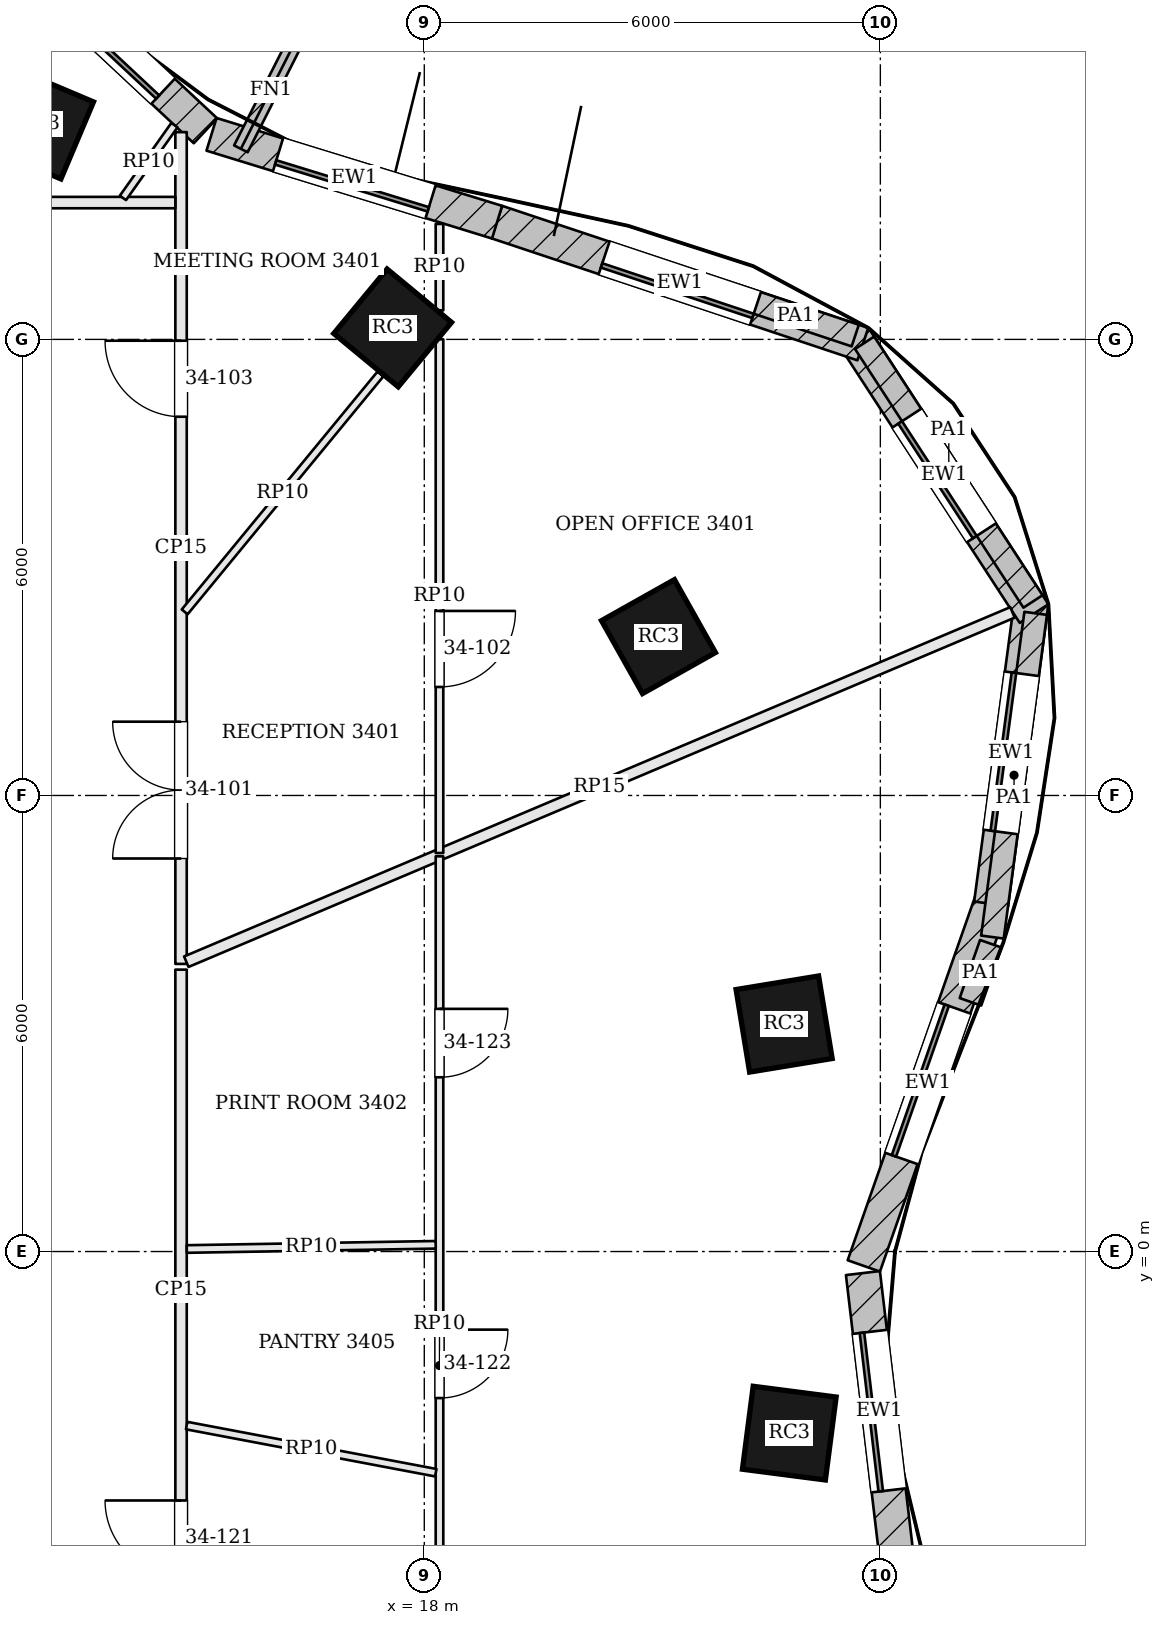
"""IFC4 building model, lengths in metres.
Left out: names, types, materials, properties, quantities, classifications, styles, units other than length and angle.
Written with IfcOpenShell. Run it as: python <this file> out.ifc"""

import sys

from ifc_helpers import new_model, si_unit, direction, frame, frame_2d, origin, origin_2d, place, context, subcontext, project, spatial, rectangle, extrude, element, fill, save


model = new_model("IFC4")
c1 = context("Model", 3, precision=1e-05, world=origin(), true_north=direction((0.0, 1.0)))
c2 = subcontext(c1, "Body", "Model", "MODEL_VIEW")
j1 = project(units=[si_unit("LENGTHUNIT", "METRE"), si_unit("PLANEANGLEUNIT", "RADIAN")], contexts=[c1])
p1 = place(None, origin())
s1 = spatial("IfcSite", under=j1, at=p1, CompositionType="ELEMENT")
p2 = place(p1, origin())
s2 = spatial("IfcBuilding", under=s1, at=p2, CompositionType="ELEMENT")
p3 = place(p2, frame((0.0, 0.0, 142.2)))
s3 = spatial("IfcBuildingStorey", under=s2, at=p3, CompositionType="ELEMENT", Elevation=142.2)
for number, where, z_axis, x_axis in (
    (1, (22.734, 2.993, 0.0), (0.0, 0.0, 1.0), (-0.162, 0.987, 0.0)),
    (2, (21.081, 8.09, 0.0), (0.0, 0.0, 1.0), (-0.49, 0.872, 0.0)),
    (3, (17.584, 12.151, 0.0), (0.0, 0.0, 1.0), (-0.771, 0.637, 0.0)),
    (4, (12.927, 14.832, 0.0), (0.0, 0.0, 1.0), (-0.921, 0.389, 0.0)),
    (5, (22.802, -2.389, 0.0), (0.0, 0.0, 1.0), (0.129, 0.992, 0.0)),
):
    element("IfcColumn", number, at=place(p3, frame(where, z_axis=z_axis, x_axis=x_axis)), inside=s3, PredefinedType="COLUMN", context=c2, shape_type="SweptSolid", body=[
        extrude(rectangle(XDim=1.1, YDim=1.1, at=origin_2d()), origin(), (0.0, 0.0, 1.0), 3.9),
    ])
p4 = place(p3, frame((23.782, -0.189, 0.0), z_axis=(0.0, 0.0, 1.0), x_axis=(0.330794307703, 0.943702880144, 0.0)))
e6 = element("IfcWall", 6, at=p4, inside=s3, PredefinedType="SOLIDWALL", context=c2, shape_type="SweptSolid", body=[
    extrude(rectangle(XDim=5.095, YDim=0.45, at=frame_2d((2.548, 0.0))), origin(), (0.0, 0.0, 1.0), 3.7),
])
p5 = place(p4, frame((1.498, 0.0, 0.9)))
e7 = element("IfcOpeningElement", 7, at=p5, cuts=e6, PredefinedType="OPENING", context=c2, shape_type="SweptSolid", body=[
    extrude(rectangle(XDim=2.1, YDim=2.3, at=frame_2d((1.05, 1.15))), frame((0.0, 0.235, 0.0), z_axis=(0.0, -1.0, 0.0), x_axis=(1.0, 0.0, 0.0)), (0.0, 0.0, 1.0), 0.47),
])
p6 = place(p3, frame((25.457, 4.575, 0.0), z_axis=(0.0, 0.0, 1.0), x_axis=(0.132475046402, 0.991186340746, 0.0)))
e8 = element("IfcWall", 8, at=p6, inside=s3, PredefinedType="SOLIDWALL", context=c2, shape_type="SweptSolid", body=[
    extrude(rectangle(XDim=4.007, YDim=0.45, at=frame_2d((2.003, 0.0))), origin(), (0.0, 0.0, 1.0), 3.7),
])
p7 = place(p6, frame((0.953, 0.0, 0.9)))
e9 = element("IfcOpeningElement", 9, at=p7, cuts=e8, PredefinedType="OPENING", context=c2, shape_type="SweptSolid", body=[
    extrude(rectangle(XDim=2.1, YDim=2.3, at=frame_2d((1.05, 1.15))), frame((0.0, 0.235, 0.0), z_axis=(0.0, -1.0, 0.0), x_axis=(1.0, 0.0, 0.0)), (0.0, 0.0, 1.0), 0.47),
])
p8 = place(p3, frame((26.022, 8.393, 0.0), z_axis=(0.0, 0.0, 1.0), x_axis=(-0.545637310328, 0.838021435035, 0.0)))
e10 = element("IfcWall", 10, at=p8, inside=s3, PredefinedType="SOLIDWALL", context=c2, shape_type="SweptSolid", body=[
    extrude(rectangle(XDim=4.336, YDim=0.45, at=frame_2d((2.168, 0.0))), origin(), (0.0, 0.0, 1.0), 3.7),
])
p9 = place(p8, frame((1.268, 0.0, 0.9)))
e11 = element("IfcOpeningElement", 11, at=p9, cuts=e10, PredefinedType="OPENING", context=c2, shape_type="SweptSolid", body=[
    extrude(rectangle(XDim=1.8, YDim=2.3, at=frame_2d((0.9, 1.15))), frame((0.0, 0.235, 0.0), z_axis=(0.0, -1.0, 0.0), x_axis=(1.0, 0.0, 0.0)), (0.0, 0.0, 1.0), 0.47),
])
p10 = place(p3, frame((23.77, 11.938, 0.0), z_axis=(0.0, 0.0, 1.0), x_axis=(-0.948673679101, 0.316256621402, 0.0)))
e12 = element("IfcWall", 12, at=p10, inside=s3, PredefinedType="SOLIDWALL", context=c2, shape_type="SweptSolid", body=[
    extrude(rectangle(XDim=5.076, YDim=0.45, at=frame_2d((2.538, 0.0))), origin(), (0.0, 0.0, 1.0), 3.7),
])
p11 = place(p10, frame((1.488, 0.0, 0.9)))
e13 = element("IfcOpeningElement", 13, at=p11, cuts=e12, PredefinedType="OPENING", context=c2, shape_type="SweptSolid", body=[
    extrude(rectangle(XDim=2.1, YDim=2.3, at=frame_2d((1.05, 1.15))), frame((0.0, 0.235, 0.0), z_axis=(0.0, -1.0, 0.0), x_axis=(1.0, 0.0, 0.0)), (0.0, 0.0, 1.0), 0.47),
])
p12 = place(p3, frame((18.958, 13.542, 0.0), z_axis=(0.0, 0.0, 1.0), x_axis=(-0.955792437529, 0.294042201668, 0.0)))
e14 = element("IfcWall", 14, at=p12, inside=s3, PredefinedType="SOLIDWALL", context=c2, shape_type="SweptSolid", body=[
    extrude(rectangle(XDim=3.931, YDim=0.45, at=frame_2d((1.965, 0.0))), origin(), (0.0, 0.0, 1.0), 3.7),
])
p13 = place(p12, frame((0.915, 0.0, 0.9)))
e15 = element("IfcOpeningElement", 15, at=p13, cuts=e14, PredefinedType="OPENING", context=c2, shape_type="SweptSolid", body=[
    extrude(rectangle(XDim=2.1, YDim=2.3, at=frame_2d((1.05, 1.15))), frame((0.0, 0.235, 0.0), z_axis=(0.0, -1.0, 0.0), x_axis=(1.0, 0.0, 0.0)), (0.0, 0.0, 1.0), 0.47),
])
p14 = place(p3, frame((15.121, 14.745, 0.0), z_axis=(0.0, 0.0, 1.0), x_axis=(-0.730618259172, 0.68278617397, 0.0)))
e16 = element("IfcWall", 16, at=p14, inside=s3, PredefinedType="SOLIDWALL", context=c2, shape_type="SweptSolid", body=[
    extrude(rectangle(XDim=3.624, YDim=0.45, at=frame_2d((1.812, 0.0))), origin(), (0.0, 0.0, 1.0), 3.7),
])
p15 = place(p14, frame((0.762, 0.0, 0.9)))
e17 = element("IfcOpeningElement", 17, at=p15, cuts=e16, PredefinedType="OPENING", context=c2, shape_type="SweptSolid", body=[
    extrude(rectangle(XDim=2.1, YDim=2.3, at=frame_2d((1.05, 1.15))), frame((0.0, 0.235, 0.0), z_axis=(0.0, -1.0, 0.0), x_axis=(1.0, 0.0, 0.0)), (0.0, 0.0, 1.0), 0.47),
])
p16 = place(p3, frame((24.201, -3.915, 0.0), z_axis=(0.0, 0.0, 1.0), x_axis=(-0.117623597589, 0.993058250703, 0.0)))
e18 = element("IfcWall", 18, at=p16, inside=s3, PredefinedType="SOLIDWALL", context=c2, shape_type="SweptSolid", body=[
    extrude(rectangle(XDim=3.657, YDim=0.45, at=frame_2d((1.829, 0.0))), origin(), (0.0, 0.0, 1.0), 3.7),
])
p17 = place(p16, frame((0.779, 0.0, 0.9)))
e19 = element("IfcOpeningElement", 19, at=p17, cuts=e18, PredefinedType="OPENING", context=c2, shape_type="SweptSolid", body=[
    extrude(rectangle(XDim=2.1, YDim=2.3, at=frame_2d((1.05, 1.15))), frame((0.0, 0.235, 0.0), z_axis=(0.0, -1.0, 0.0), x_axis=(1.0, 0.0, 0.0)), (0.0, 0.0, 1.0), 0.47),
])
p18 = place(p3, frame((15.587, 14.507, 0.0), z_axis=(0.0, 0.0, 1.0), x_axis=(0.452117231361, 0.89195852432, 0.0)))
e20 = element("IfcWall", 20, at=p18, inside=s3, PredefinedType="SOLIDWALL", context=c2, shape_type="SweptSolid", body=[
    extrude(rectangle(XDim=1.75, YDim=0.2, at=frame_2d((0.875, 0.0))), origin(), (0.0, 0.0, 1.0), 3.7),
])
p19 = place(p3, frame((25.185, 3.285, 3.9), z_axis=(0.0, 0.0, 1.0), x_axis=(0.330927638021, 0.943656133554, 0.0)))
e21 = element("IfcWall", 21, at=p19, inside=s3, PredefinedType="PARAPET", context=c2, shape_type="SweptSolid", body=[
    extrude(rectangle(XDim=0.81, YDim=0.3, at=frame_2d((0.405, 0.0))), origin(), (0.0, 0.0, 1.0), 1.1),
])
p20 = place(p3, frame((25.474, 4.137, 3.9), z_axis=(0.0, 0.0, 1.0), x_axis=(0.132506125812, 0.991182186393, 0.0)))
e22 = element("IfcWall", 22, at=p20, inside=s3, PredefinedType="PARAPET", context=c2, shape_type="SweptSolid", body=[
    extrude(rectangle(XDim=4.297, YDim=0.3, at=frame_2d((2.148, 0.0))), origin(), (0.0, 0.0, 1.0), 1.1),
])
p21 = place(p3, frame((26.008, 8.552, 3.9), z_axis=(0.0, 0.0, 1.0), x_axis=(-0.545634876254, 0.83802301986, 0.0)))
e23 = element("IfcWall", 23, at=p21, inside=s3, PredefinedType="PARAPET", context=c2, shape_type="SweptSolid", body=[
    extrude(rectangle(XDim=4.061, YDim=0.3, at=frame_2d((2.03, 0.0))), origin(), (0.0, 0.0, 1.0), 1.1),
])
p22 = place(p3, frame((23.67, 12.05, 3.9), z_axis=(0.0, 0.0, 1.0), x_axis=(-0.948683298051, 0.316227766017, 0.0)))
e24 = element("IfcWall", 24, at=p22, inside=s3, PredefinedType="PARAPET", context=c2, shape_type="SweptSolid", body=[
    extrude(rectangle(XDim=1.655, YDim=0.3, at=frame_2d((0.827, 0.0))), origin(), (0.0, 0.0, 1.0), 1.1),
])
p23 = place(p3, frame((14.8, 3.784, 0.0), z_axis=(0.0, 0.0, 1.0), x_axis=(0.0, 1.0, 0.0)))
e25 = element("IfcWall", 25, at=p23, inside=s3, PredefinedType="PARTITIONING", context=c2, shape_type="SweptSolid", body=[
    extrude(rectangle(XDim=10.943, YDim=0.15, at=frame_2d((5.472, 0.0))), origin(), (0.0, 0.0, 1.0), 3.198),
])
p24 = place(p23, frame((1.387, 0.0, 0.0)))
e26 = element("IfcOpeningElement", 26, at=p24, cuts=e25, PredefinedType="OPENING", context=c2, shape_type="SweptSolid", body=[
    extrude(rectangle(XDim=1.8, YDim=2.1, at=frame_2d((0.9, 1.05))), frame((0.0, 0.085, 0.0), z_axis=(0.0, -1.0, 0.0), x_axis=(1.0, 0.0, 0.0)), (0.0, 0.0, 1.0), 0.17),
])
p25 = place(p23, frame((7.199, 0.0, 0.0)))
e27 = element("IfcOpeningElement", 27, at=p25, cuts=e25, PredefinedType="OPENING", context=c2, shape_type="SweptSolid", body=[
    extrude(rectangle(XDim=1.0, YDim=2.4, at=frame_2d((0.5, 1.2))), frame((0.0, 0.085, 0.0), z_axis=(0.0, -1.0, 0.0), x_axis=(1.0, 0.0, 0.0)), (0.0, 0.0, 1.0), 0.17),
])
p26 = place(p3, frame((14.725, 13.8, 0.0), z_axis=(0.0, 0.0, 1.0), x_axis=(-1.0, 0.0, 0.0)))
e28 = element("IfcWall", 28, at=p26, inside=s3, PredefinedType="PARTITIONING", context=c2, shape_type="SweptSolid", body=[
    extrude(rectangle(XDim=11.638, YDim=0.15, at=frame_2d((5.819, 0.0))), origin(), (0.0, 0.0, 1.0), 3.198),
])
p27 = place(p26, frame((2.95, 0.0, 0.0)))
e29 = element("IfcOpeningElement", 29, at=p27, cuts=e28, PredefinedType="OPENING", context=c2, shape_type="SweptSolid", body=[
    extrude(rectangle(XDim=1.0, YDim=2.1, at=frame_2d((0.5, 1.05))), frame((0.0, 0.085, 0.0), z_axis=(0.0, -1.0, 0.0), x_axis=(1.0, 0.0, 0.0)), (0.0, 0.0, 1.0), 0.17),
])
p28 = place(p26, frame((8.35, 0.0, 0.0)))
e30 = element("IfcOpeningElement", 30, at=p28, cuts=e28, PredefinedType="OPENING", context=c2, shape_type="SweptSolid", body=[
    extrude(rectangle(XDim=1.0, YDim=2.1, at=frame_2d((0.5, 1.05))), frame((0.0, 0.085, 0.0), z_axis=(0.0, -1.0, 0.0), x_axis=(1.0, 0.0, 0.0)), (0.0, 0.0, 1.0), 0.17),
])
p29 = place(p3, frame((25.739, 8.408, 0.0), z_axis=(0.0, 0.0, 1.0), x_axis=(-0.921062306608, -0.389415237692, 0.0)))
e31 = element("IfcWall", 31, at=p29, inside=s3, PredefinedType="PARTITIONING", context=c2, shape_type="SweptSolid", body=[
    extrude(rectangle(XDim=11.801, YDim=0.15, at=frame_2d((5.9, 0.0))), origin(), (0.0, 0.0, 1.0), 3.198),
])
p30 = place(p3, frame((14.8, -4.725, 0.0), z_axis=(0.0, 0.0, 1.0), x_axis=(0.0, 1.0, 0.0)))
e32 = element("IfcWall", 32, at=p30, inside=s3, PredefinedType="PARTITIONING", context=c2, shape_type="SweptSolid", body=[
    extrude(rectangle(XDim=8.434, YDim=0.15, at=frame_2d((4.217, 0.0))), origin(), (0.0, 0.0, 1.0), 3.198),
])
p31 = place(p30, frame((0.45, 0.0, 0.0)))
e33 = element("IfcOpeningElement", 33, at=p31, cuts=e32, PredefinedType="OPENING", context=c2, shape_type="SweptSolid", body=[
    extrude(rectangle(XDim=1.0, YDim=2.4, at=frame_2d((0.5, 1.2))), frame((0.0, 0.085, 0.0), z_axis=(0.0, -1.0, 0.0), x_axis=(1.0, 0.0, 0.0)), (0.0, 0.0, 1.0), 0.17),
])
p32 = place(p3, frame((18.2, 13.519, 0.0), z_axis=(0.0, 0.0, 1.0), x_axis=(0.0, -1.0, 0.0)))
e34 = element("IfcWall", 34, at=p32, inside=s3, PredefinedType="PARTITIONING", context=c2, shape_type="SweptSolid", body=[
    extrude(rectangle(XDim=1.138, YDim=0.1, at=frame_2d((0.569, 0.0))), origin(), (0.0, 0.0, 1.0), 3.184),
])
p33 = place(p3, frame((18.2, 12.001, 0.0), z_axis=(0.0, 0.0, 1.0), x_axis=(0.0, -1.0, 0.0)))
e35 = element("IfcWall", 35, at=p33, inside=s3, PredefinedType="PARTITIONING", context=c2, shape_type="SweptSolid", body=[
    extrude(rectangle(XDim=6.759, YDim=0.1, at=frame_2d((3.379, 0.0))), origin(), (0.0, 0.0, 1.0), 3.184),
])
p34 = place(p33, frame((3.574, 0.0, 0.0)))
e36 = element("IfcOpeningElement", 36, at=p34, cuts=e35, PredefinedType="OPENING", context=c2, shape_type="SweptSolid", body=[
    extrude(rectangle(XDim=1.0, YDim=2.1, at=frame_2d((0.5, 1.05))), frame((0.0, 0.06, 0.0), z_axis=(0.0, -1.0, 0.0), x_axis=(1.0, 0.0, 0.0)), (0.0, 0.0, 1.0), 0.12),
])
p35 = place(p3, frame((14.848, 8.415, 0.0), z_axis=(0.0, 0.0, 1.0), x_axis=(0.63542004032, 0.77216667395, 0.0)))
e37 = element("IfcWall", 37, at=p35, inside=s3, PredefinedType="PARTITIONING", context=c2, shape_type="SweptSolid", body=[
    extrude(rectangle(XDim=4.053, YDim=0.1, at=frame_2d((2.026, 0.0))), origin(), (0.0, 0.0, 1.0), 3.184),
])
p36 = place(p3, frame((14.035, 13.861, 0.0), z_axis=(0.0, 0.0, 1.0), x_axis=(0.57745118401, 0.816425214019, 0.0)))
e38 = element("IfcWall", 38, at=p36, inside=s3, PredefinedType="PARTITIONING", context=c2, shape_type="SweptSolid", body=[
    extrude(rectangle(XDim=1.173, YDim=0.1, at=frame_2d((0.586, 0.0))), origin(), (0.0, 0.0, 1.0), 3.184),
])
p37 = place(p3, frame((18.2, 5.199, 0.0), z_axis=(0.0, 0.0, 1.0), x_axis=(0.0, -1.0, 0.0)))
e39 = element("IfcWall", 39, at=p37, inside=s3, PredefinedType="PARTITIONING", context=c2, shape_type="SweptSolid", body=[
    extrude(rectangle(XDim=13.399, YDim=0.1, at=frame_2d((6.7, 0.0))), origin(), (0.0, 0.0, 1.0), 3.184),
])
p38 = place(p37, frame((6.227, 0.0, 0.0)))
e40 = element("IfcOpeningElement", 40, at=p38, cuts=e39, PredefinedType="OPENING", context=c2, shape_type="SweptSolid", body=[
    extrude(rectangle(XDim=0.9, YDim=2.1, at=frame_2d((0.45, 1.05))), frame((0.0, 0.06, 0.0), z_axis=(0.0, -1.0, 0.0), x_axis=(1.0, 0.0, 0.0)), (0.0, 0.0, 1.0), 0.12),
])
p39 = place(p37, frame((2.007, 0.0, 0.0)))
e41 = element("IfcOpeningElement", 41, at=p39, cuts=e39, PredefinedType="OPENING", context=c2, shape_type="SweptSolid", body=[
    extrude(rectangle(XDim=0.9, YDim=2.1, at=frame_2d((0.45, 1.05))), frame((0.0, 0.06, 0.0), z_axis=(0.0, -1.0, 0.0), x_axis=(1.0, 0.0, 0.0)), (0.0, 0.0, 1.0), 0.12),
])
p40 = place(p3, frame((14.874, -2.29, 0.0), z_axis=(0.0, 0.0, 1.0), x_axis=(0.982563379302, -0.185927958238, 0.0)))
e42 = element("IfcWall", 42, at=p40, inside=s3, PredefinedType="PARTITIONING", context=c2, shape_type="SweptSolid", body=[
    extrude(rectangle(XDim=3.335, YDim=0.1, at=frame_2d((1.667, 0.0))), origin(), (0.0, 0.0, 1.0), 3.184),
])
p41 = place(p3, frame((14.875, 0.033, 0.0), z_axis=(0.0, 0.0, 1.0), x_axis=(0.999856843244, 0.016920195573, 0.0)))
e43 = element("IfcWall", 43, at=p41, inside=s3, PredefinedType="PARTITIONING", context=c2, shape_type="SweptSolid", body=[
    extrude(rectangle(XDim=3.275, YDim=0.1, at=frame_2d((1.638, 0.0))), origin(), (0.0, 0.0, 1.0), 3.184),
])
p42 = place(p5, origin())
e44 = element("IfcWindow", 44, at=p42, inside=s3, PartitioningType="SINGLE_PANEL", PredefinedType="WINDOW", context=c2, shape_type="SweptSolid", body=[
    extrude(rectangle(XDim=2.1, YDim=2.3, at=frame_2d((1.05, 1.15))), frame((0.0, 0.135, 0.0), z_axis=(0.0, -1.0, 0.0), x_axis=(1.0, 0.0, 0.0)), (0.0, 0.0, 1.0), 0.06),
])
fill(e7, e44)
p43 = place(p7, origin())
e45 = element("IfcWindow", 45, at=p43, inside=s3, PartitioningType="SINGLE_PANEL", PredefinedType="WINDOW", context=c2, shape_type="SweptSolid", body=[
    extrude(rectangle(XDim=2.1, YDim=2.3, at=frame_2d((1.05, 1.15))), frame((0.0, 0.135, 0.0), z_axis=(0.0, -1.0, 0.0), x_axis=(1.0, 0.0, 0.0)), (0.0, 0.0, 1.0), 0.06),
])
fill(e9, e45)
p44 = place(p9, origin())
e46 = element("IfcWindow", 46, at=p44, inside=s3, PartitioningType="SINGLE_PANEL", PredefinedType="WINDOW", context=c2, shape_type="SweptSolid", body=[
    extrude(rectangle(XDim=1.8, YDim=2.3, at=frame_2d((0.9, 1.15))), frame((0.0, 0.135, 0.0), z_axis=(0.0, -1.0, 0.0), x_axis=(1.0, 0.0, 0.0)), (0.0, 0.0, 1.0), 0.06),
])
fill(e11, e46)
p45 = place(p11, origin())
e47 = element("IfcWindow", 47, at=p45, inside=s3, PartitioningType="SINGLE_PANEL", PredefinedType="WINDOW", context=c2, shape_type="SweptSolid", body=[
    extrude(rectangle(XDim=2.1, YDim=2.3, at=frame_2d((1.05, 1.15))), frame((0.0, 0.135, 0.0), z_axis=(0.0, -1.0, 0.0), x_axis=(1.0, 0.0, 0.0)), (0.0, 0.0, 1.0), 0.06),
])
fill(e13, e47)
p46 = place(p13, origin())
e48 = element("IfcWindow", 48, at=p46, inside=s3, PartitioningType="SINGLE_PANEL", PredefinedType="WINDOW", context=c2, shape_type="SweptSolid", body=[
    extrude(rectangle(XDim=2.1, YDim=2.3, at=frame_2d((1.05, 1.15))), frame((0.0, 0.135, 0.0), z_axis=(0.0, -1.0, 0.0), x_axis=(1.0, 0.0, 0.0)), (0.0, 0.0, 1.0), 0.06),
])
fill(e15, e48)
p47 = place(p15, origin())
e49 = element("IfcWindow", 49, at=p47, inside=s3, PartitioningType="SINGLE_PANEL", PredefinedType="WINDOW", context=c2, shape_type="SweptSolid", body=[
    extrude(rectangle(XDim=2.1, YDim=2.3, at=frame_2d((1.05, 1.15))), frame((0.0, 0.135, 0.0), z_axis=(0.0, -1.0, 0.0), x_axis=(1.0, 0.0, 0.0)), (0.0, 0.0, 1.0), 0.06),
])
fill(e17, e49)
p48 = place(p17, origin())
e50 = element("IfcWindow", 50, at=p48, inside=s3, PartitioningType="SINGLE_PANEL", PredefinedType="WINDOW", context=c2, shape_type="SweptSolid", body=[
    extrude(rectangle(XDim=2.1, YDim=2.3, at=frame_2d((1.05, 1.15))), frame((0.0, 0.135, 0.0), z_axis=(0.0, -1.0, 0.0), x_axis=(1.0, 0.0, 0.0)), (0.0, 0.0, 1.0), 0.06),
])
fill(e19, e50)
p49 = place(p24, origin())
e51 = element("IfcDoor", 51, at=p49, inside=s3, OperationType="DOUBLE_DOOR_SINGLE_SWING", PredefinedType="DOOR", context=c2, shape_type="SweptSolid", body=[
    extrude(rectangle(XDim=1.8, YDim=2.1, at=frame_2d((0.9, 1.05))), frame((0.0, 0.025, 0.0), z_axis=(0.0, -1.0, 0.0), x_axis=(1.0, 0.0, 0.0)), (0.0, 0.0, 1.0), 0.05),
])
fill(e26, e51)
p50 = place(p34, origin())
e52 = element("IfcDoor", 52, at=p50, inside=s3, OperationType="SINGLE_SWING_LEFT", PredefinedType="DOOR", context=c2, shape_type="SweptSolid", body=[
    extrude(rectangle(XDim=1.0, YDim=2.1, at=frame_2d((0.5, 1.05))), frame((0.0, 0.025, 0.0), z_axis=(0.0, -1.0, 0.0), x_axis=(1.0, 0.0, 0.0)), (0.0, 0.0, 1.0), 0.05),
])
fill(e36, e52)
p51 = place(p25, origin())
e53 = element("IfcDoor", 53, at=p51, inside=s3, OperationType="SINGLE_SWING_RIGHT", PredefinedType="DOOR", context=c2, shape_type="SweptSolid", body=[
    extrude(rectangle(XDim=1.0, YDim=2.4, at=frame_2d((0.5, 1.2))), frame((0.0, 0.025, 0.0), z_axis=(0.0, -1.0, 0.0), x_axis=(1.0, 0.0, 0.0)), (0.0, 0.0, 1.0), 0.05),
])
fill(e27, e53)
p52 = place(p31, origin())
e54 = element("IfcDoor", 54, at=p52, inside=s3, OperationType="SINGLE_SWING_RIGHT", PredefinedType="DOOR", context=c2, shape_type="SweptSolid", body=[
    extrude(rectangle(XDim=1.0, YDim=2.4, at=frame_2d((0.5, 1.2))), frame((0.0, 0.025, 0.0), z_axis=(0.0, -1.0, 0.0), x_axis=(1.0, 0.0, 0.0)), (0.0, 0.0, 1.0), 0.05),
])
fill(e33, e54)
p53 = place(p38, origin())
e55 = element("IfcDoor", 55, at=p53, inside=s3, OperationType="SINGLE_SWING_LEFT", PredefinedType="DOOR", context=c2, shape_type="SweptSolid", body=[
    extrude(rectangle(XDim=0.9, YDim=2.1, at=frame_2d((0.45, 1.05))), frame((0.0, 0.025, 0.0), z_axis=(0.0, -1.0, 0.0), x_axis=(1.0, 0.0, 0.0)), (0.0, 0.0, 1.0), 0.05),
])
fill(e40, e55)
p54 = place(p39, origin())
e56 = element("IfcDoor", 56, at=p54, inside=s3, OperationType="SINGLE_SWING_LEFT", PredefinedType="DOOR", context=c2, shape_type="SweptSolid", body=[
    extrude(rectangle(XDim=0.9, YDim=2.1, at=frame_2d((0.45, 1.05))), frame((0.0, 0.025, 0.0), z_axis=(0.0, -1.0, 0.0), x_axis=(1.0, 0.0, 0.0)), (0.0, 0.0, 1.0), 0.05),
])
fill(e41, e56)
save(model, sys.argv[1])
